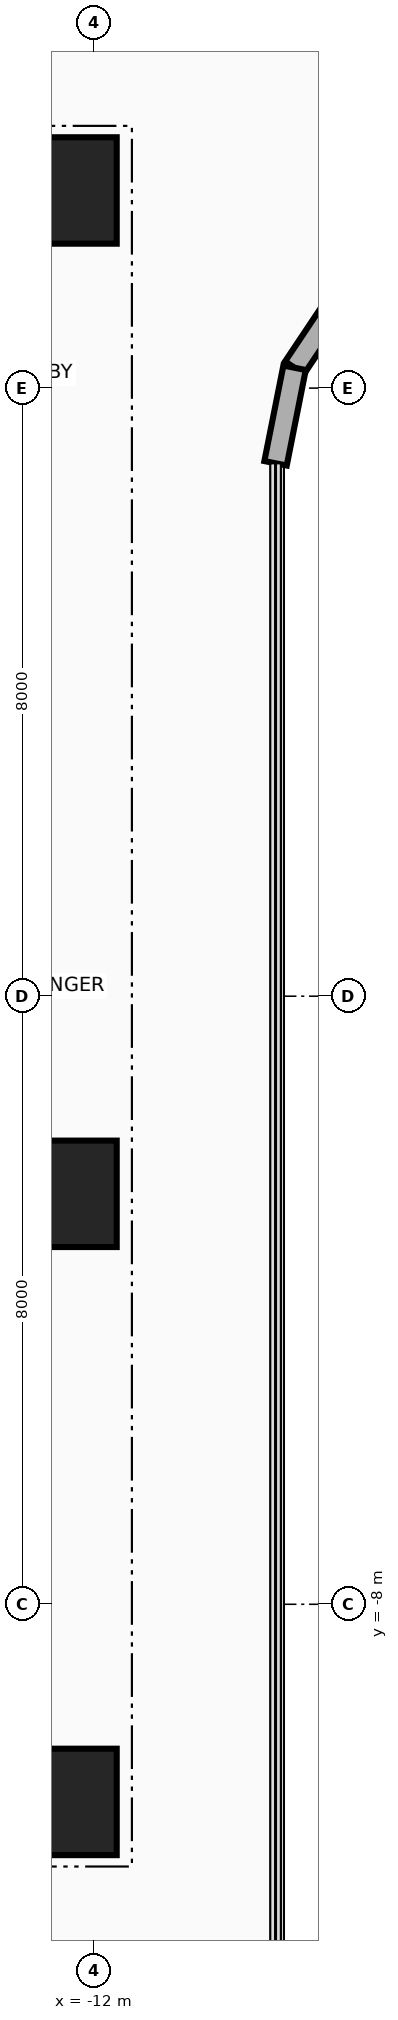
"""IFC4 building model, lengths in metres.
Left out: names, types, materials, properties, quantities, classifications, styles, units other than length and angle.
Written with IfcOpenShell. Run it as: python <this file> out.ifc"""

import sys

from ifc_helpers import new_model, si_unit, direction, frame, frame_2d, origin, origin_2d, place, context, subcontext, project, spatial, rectangle, extrude, source, transform, mapped, element, save


model = new_model("IFC4")
c1 = context("Model", 3, precision=1e-05, world=origin(), true_north=direction((0.0, 1.0)))
c2 = subcontext(c1, "Body", "Model", "MODEL_VIEW")
j1 = project(units=[si_unit("LENGTHUNIT", "METRE"), si_unit("PLANEANGLEUNIT", "RADIAN")], contexts=[c1])
p1 = place(None, origin())
s1 = spatial("IfcSite", under=j1, at=p1, CompositionType="ELEMENT")
p2 = place(p1, origin())
s2 = spatial("IfcBuilding", under=s1, at=p2, CompositionType="ELEMENT")
p3 = place(p2, frame((0.0, 0.0, 88.9)))
s3 = spatial("IfcBuildingStorey", under=s2, at=p3, CompositionType="ELEMENT", Elevation=88.9)
for number, where, z_axis, x_axis in (
    (1, (-22.65, 10.8, 0.0), (0.0, 0.0, 1.0), (1.0, 0.0, 0.0)),
    (2, (-22.65, -10.8, 0.0), (0.0, 0.0, 1.0), (1.0, 0.0, 0.0)),
):
    element("IfcWall", number, at=place(p3, frame(where, z_axis=z_axis, x_axis=x_axis)), inside=s3, PredefinedType="SHEAR", context=c2, shape_type="SweptSolid", body=[
        extrude(rectangle(XDim=10.25, YDim=0.7, at=frame_2d((5.125, 0.0))), origin(), (0.0, 0.0, 1.0), 3.46),
    ])
m1 = source(origin(), c2, "Body", "SweptSolid", [
    extrude(rectangle(XDim=1.4, YDim=1.4, at=origin_2d()), origin(), (0.0, 0.0, 1.0), 3.7),
])
for number, where, z_axis, x_axis in (
    (3, (-12.4, -10.6, 0.0), (0.0, 0.0, 1.0), (1.0, 0.0, 0.0)),
    (4, (-12.4, -2.6, 0.0), (0.0, 0.0, 1.0), (1.0, 0.0, 0.0)),
    (5, (-12.4, 10.6, 0.0), (0.0, 0.0, 1.0), (1.0, 0.0, 0.0)),
):
    element("IfcColumn", number, at=place(p3, frame(where, z_axis=z_axis, x_axis=x_axis)), inside=s3, PredefinedType="COLUMN", context=c2, shape_type="MappedRepresentation", body=[
        mapped(m1, transform((0.0, 0.0, 0.0), x_axis=(1.0, 0.0, 0.0), y_axis=(0.0, 1.0, 0.0), z_axis=(0.0, 0.0, 1.0), scale=1.0)),
    ])
p4 = place(p3, frame((-8.642, 9.342, 0.0), z_axis=(0.0, 0.0, 1.0), x_axis=(-0.555615398575, -0.831439431869, 0.0)))
e6 = element("IfcWall", 6, at=p4, inside=s3, PredefinedType="SOLIDWALL", context=c2, shape_type="SweptSolid", body=[
    extrude(rectangle(XDim=1.292, YDim=0.3, at=frame_2d((0.646, 0.0))), origin(), (0.0, 0.0, 1.0), 3.46),
])
p5 = place(p3, frame((-9.36, 8.268, 0.0), z_axis=(0.0, 0.0, 1.0), x_axis=(-0.195090163074, -0.980785312019, 0.0)))
e7 = element("IfcWall", 7, at=p5, inside=s3, PredefinedType="SOLIDWALL", context=c2, shape_type="SweptSolid", body=[
    extrude(rectangle(XDim=1.281, YDim=0.3, at=frame_2d((0.641, 0.0))), origin(), (0.0, 0.0, 1.0), 3.46),
])
save(model, sys.argv[1])
